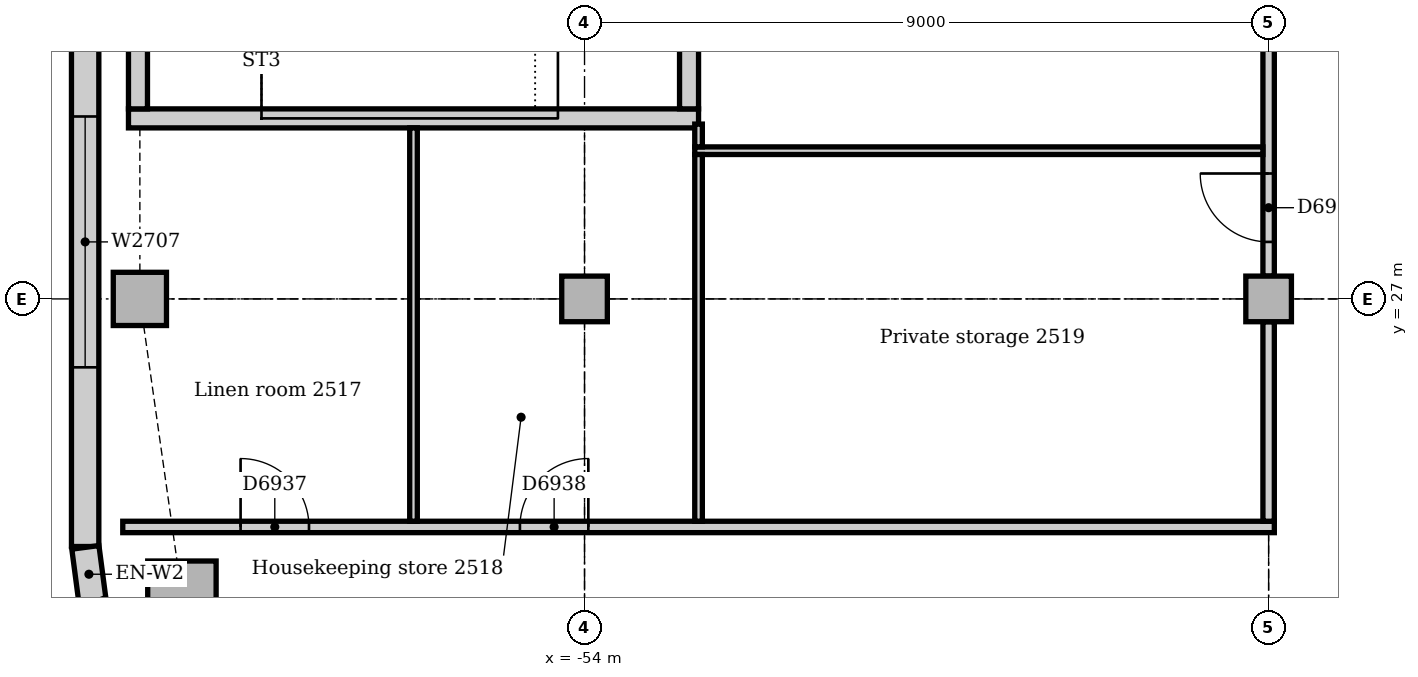
"""IFC4 building model, lengths in metres.
Left out: names, types, materials, properties, quantities, classifications, styles, units other than length and angle.
Written with IfcOpenShell. Run it as: python <this file> out.ifc"""

import sys

from ifc_helpers import new_model, si_unit, direction, frame, frame_2d, origin, origin_2d, place, context, subcontext, project, spatial, rectangle, extrude, element, fill, save


model = new_model("IFC4")
c1 = context("Model", 3, precision=1e-05, world=origin(), true_north=direction((0.0, 1.0)))
c2 = subcontext(c1, "Body", "Model", "MODEL_VIEW")
j1 = project(units=[si_unit("LENGTHUNIT", "METRE"), si_unit("PLANEANGLEUNIT", "RADIAN")], contexts=[c1])
p1 = place(None, origin())
s1 = spatial("IfcSite", under=j1, at=p1, CompositionType="ELEMENT")
p2 = place(p1, origin())
s2 = spatial("IfcBuilding", under=s1, at=p2, CompositionType="ELEMENT")
p3 = place(p2, frame((0.0, 0.0, 108.0)))
s3 = spatial("IfcBuildingStorey", under=s2, at=p3, CompositionType="ELEMENT", Elevation=108.0)
p4 = place(p3, frame((-60.0, 29.375, 0.0), z_axis=(0.0, 0.0, 1.0), x_axis=(1.0, 0.0, 0.0)))
e1 = element("IfcWall", 1, at=p4, inside=s3, PredefinedType="SOLIDWALL", context=c2, shape_type="SweptSolid", body=[
    extrude(rectangle(XDim=7.5, YDim=0.25, at=frame_2d((3.75, 0.0))), origin(), (0.0, 0.0, 1.0), 4.0),
])
for number, where, z_axis, x_axis in (
    (2, (-52.625, 29.5, 0.0), (0.0, 0.0, 1.0), (0.0, 1.0, 0.0)),
    (3, (-59.875, 33.5, 0.0), (0.0, 0.0, 1.0), (0.0, -1.0, 0.0)),
):
    element("IfcWall", number, at=place(p3, frame(where, z_axis=z_axis, x_axis=x_axis)), inside=s3, PredefinedType="SOLIDWALL", context=c2, shape_type="SweptSolid", body=[
        extrude(rectangle(XDim=4.0, YDim=0.25, at=frame_2d((2.0, 0.0))), origin(), (0.0, 0.0, 1.0), 4.0),
    ])
p5 = place(p3, frame((-59.297, 23.102, 0.0), z_axis=(0.0, 0.0, 1.0), x_axis=(1.0, 0.0, 0.0)))
e4 = element("IfcColumn", 4, at=p5, inside=s3, PredefinedType="COLUMN", context=c2, shape_type="SweptSolid", body=[
    extrude(rectangle(XDim=0.9, YDim=0.9, at=origin_2d()), origin(), (0.0, 0.0, 1.0), 3.85),
])
p6 = place(p3, frame((-59.85, 27.0, 0.0), z_axis=(0.0, 0.0, 1.0), x_axis=(1.0, 0.0, 0.0)))
e5 = element("IfcColumn", 5, at=p6, inside=s3, PredefinedType="COLUMN", context=c2, shape_type="SweptSolid", body=[
    extrude(rectangle(XDim=0.7, YDim=0.7, at=origin_2d()), origin(), (0.0, 0.0, 1.0), 3.85),
])
for number, where, z_axis, x_axis in (
    (6, (-54.0, 27.0, 0.0), (0.0, 0.0, 1.0), (1.0, 0.0, 0.0)),
    (7, (-45.0, 27.0, 0.0), (0.0, 0.0, 1.0), (1.0, 0.0, 0.0)),
):
    element("IfcColumn", number, at=place(p3, frame(where, z_axis=z_axis, x_axis=x_axis)), inside=s3, PredefinedType="COLUMN", context=c2, shape_type="SweptSolid", body=[
        extrude(rectangle(XDim=0.6, YDim=0.6, at=origin_2d()), origin(), (0.0, 0.0, 1.0), 3.85),
    ])
p7 = place(p3, frame((-60.57, 45.257, 0.0), z_axis=(0.0, 0.0, 1.0), x_axis=(0.0, -1.0, 0.0)))
e8 = element("IfcWall", 8, at=p7, inside=s3, PredefinedType="STANDARD", context=c2, shape_type="SweptSolid", body=[
    extrude(rectangle(XDim=21.515, YDim=0.36, at=frame_2d((10.757, 0.0))), origin(), (0.0, 0.0, 1.0), 3.85),
])
p8 = place(p7, frame((3.107, 0.0, 0.9)))
e9 = element("IfcOpeningElement", 9, at=p8, cuts=e8, PredefinedType="OPENING", context=c2, shape_type="SweptSolid", body=[
    extrude(rectangle(XDim=1.8, YDim=1.6, at=frame_2d((0.9, 0.8))), frame((0.0, 0.19, 0.0), z_axis=(0.0, -1.0, 0.0), x_axis=(1.0, 0.0, 0.0)), (0.0, 0.0, 1.0), 0.38),
])
p9 = place(p7, frame((6.857, 0.0, 0.9)))
e10 = element("IfcOpeningElement", 10, at=p9, cuts=e8, PredefinedType="OPENING", context=c2, shape_type="SweptSolid", body=[
    extrude(rectangle(XDim=3.3, YDim=1.6, at=frame_2d((1.65, 0.8))), frame((0.0, 0.19, 0.0), z_axis=(0.0, -1.0, 0.0), x_axis=(1.0, 0.0, 0.0)), (0.0, 0.0, 1.0), 0.38),
])
p10 = place(p7, frame((11.357, 0.0, 0.9)))
e11 = element("IfcOpeningElement", 11, at=p10, cuts=e8, PredefinedType="OPENING", context=c2, shape_type="SweptSolid", body=[
    extrude(rectangle(XDim=3.3, YDim=1.6, at=frame_2d((1.65, 0.8))), frame((0.0, 0.19, 0.0), z_axis=(0.0, -1.0, 0.0), x_axis=(1.0, 0.0, 0.0)), (0.0, 0.0, 1.0), 0.38),
])
p11 = place(p7, frame((15.857, 0.0, 0.9)))
e12 = element("IfcOpeningElement", 12, at=p11, cuts=e8, PredefinedType="OPENING", context=c2, shape_type="SweptSolid", body=[
    extrude(rectangle(XDim=3.3, YDim=1.6, at=frame_2d((1.65, 0.8))), frame((0.0, 0.19, 0.0), z_axis=(0.0, -1.0, 0.0), x_axis=(1.0, 0.0, 0.0)), (0.0, 0.0, 1.0), 0.38),
])
p12 = place(p3, frame((-60.567, 23.731, 0.0), z_axis=(0.0, 0.0, 1.0), x_axis=(0.13055608231, -0.99144092581, 0.0)))
e13 = element("IfcWall", 13, at=p12, inside=s3, PredefinedType="STANDARD", context=c2, shape_type="SweptSolid", body=[
    extrude(rectangle(XDim=0.713, YDim=0.36, at=frame_2d((0.356, 0.0))), origin(), (0.0, 0.0, 1.0), 3.85),
])
p13 = place(p3, frame((-60.075, 24.0, 0.0), z_axis=(0.0, 0.0, 1.0), x_axis=(1.0, 0.0, 0.0)))
e14 = element("IfcWall", 14, at=p13, inside=s3, PredefinedType="PARTITIONING", context=c2, shape_type="SweptSolid", body=[
    extrude(rectangle(XDim=15.15, YDim=0.15, at=frame_2d((7.575, 0.0))), origin(), (0.0, 0.0, 1.0), 3.85),
])
p14 = place(p13, frame((1.55, 0.0, 0.0)))
e15 = element("IfcOpeningElement", 15, at=p14, cuts=e14, PredefinedType="OPENING", context=c2, shape_type="SweptSolid", body=[
    extrude(rectangle(XDim=0.9, YDim=2.1, at=frame_2d((0.45, 1.05))), frame((0.0, 0.085, 0.0), z_axis=(0.0, -1.0, 0.0), x_axis=(1.0, 0.0, 0.0)), (0.0, 0.0, 1.0), 0.17),
])
p15 = place(p13, frame((5.225, 0.0, 0.0)))
e16 = element("IfcOpeningElement", 16, at=p15, cuts=e14, PredefinedType="OPENING", context=c2, shape_type="SweptSolid", body=[
    extrude(rectangle(XDim=0.9, YDim=2.1, at=frame_2d((0.45, 1.05))), frame((0.0, 0.085, 0.0), z_axis=(0.0, -1.0, 0.0), x_axis=(1.0, 0.0, 0.0)), (0.0, 0.0, 1.0), 0.17),
])
p16 = place(p3, frame((-45.0, 24.075, 0.0), z_axis=(0.0, 0.0, 1.0), x_axis=(0.0, 1.0, 0.0)))
e17 = element("IfcWall", 17, at=p16, inside=s3, PredefinedType="PARTITIONING", context=c2, shape_type="SweptSolid", body=[
    extrude(rectangle(XDim=2.625, YDim=0.15, at=frame_2d((1.312, 0.0))), origin(), (0.0, 0.0, 1.0), 3.362),
])
p17 = place(p3, frame((-45.0, 27.3, 0.0), z_axis=(0.0, 0.0, 1.0), x_axis=(0.0, 1.0, 0.0)))
e18 = element("IfcWall", 18, at=p17, inside=s3, PredefinedType="PARTITIONING", context=c2, shape_type="SweptSolid", body=[
    extrude(rectangle(XDim=6.675, YDim=0.15, at=frame_2d((3.337, 0.0))), origin(), (0.0, 0.0, 1.0), 3.362),
])
p18 = place(p17, frame((0.45, 0.0, 0.0)))
e19 = element("IfcOpeningElement", 19, at=p18, cuts=e18, PredefinedType="OPENING", context=c2, shape_type="SweptSolid", body=[
    extrude(rectangle(XDim=0.9, YDim=2.1, at=frame_2d((0.45, 1.05))), frame((0.0, 0.085, 0.0), z_axis=(0.0, -1.0, 0.0), x_axis=(1.0, 0.0, 0.0)), (0.0, 0.0, 1.0), 0.17),
])
p19 = place(p3, frame((-52.55, 28.95, 0.0), z_axis=(0.0, 0.0, 1.0), x_axis=(1.0, 0.0, 0.0)))
e20 = element("IfcWall", 20, at=p19, inside=s3, PredefinedType="PARTITIONING", context=c2, shape_type="SweptSolid", body=[
    extrude(rectangle(XDim=7.475, YDim=0.1, at=frame_2d((3.737, 0.0))), origin(), (0.0, 0.0, 1.0), 3.85),
])
p20 = place(p3, frame((-56.25, 24.075, 0.0), z_axis=(0.0, 0.0, 1.0), x_axis=(0.0, 1.0, 0.0)))
e21 = element("IfcWall", 21, at=p20, inside=s3, PredefinedType="PARTITIONING", context=c2, shape_type="SweptSolid", body=[
    extrude(rectangle(XDim=5.175, YDim=0.1, at=frame_2d((2.587, 0.0))), origin(), (0.0, 0.0, 1.0), 3.85),
])
p21 = place(p3, frame((-52.5, 29.0, 0.0), z_axis=(0.0, 0.0, 1.0), x_axis=(0.0, 1.0, 0.0)))
e22 = element("IfcWall", 22, at=p21, inside=s3, PredefinedType="PARTITIONING", context=c2, shape_type="SweptSolid", body=[
    extrude(rectangle(XDim=0.3, YDim=0.1, at=frame_2d((0.15, 0.0))), origin(), (0.0, 0.0, 1.0), 3.85),
])
p22 = place(p3, frame((-52.5, 24.075, 0.0), z_axis=(0.0, 0.0, 1.0), x_axis=(0.0, 1.0, 0.0)))
e23 = element("IfcWall", 23, at=p22, inside=s3, PredefinedType="PARTITIONING", context=c2, shape_type="SweptSolid", body=[
    extrude(rectangle(XDim=4.825, YDim=0.1, at=frame_2d((2.413, 0.0))), origin(), (0.0, 0.0, 1.0), 3.85),
])
p23 = place(p11, origin())
e24 = element("IfcWindow", 24, at=p23, inside=s3, PartitioningType="SINGLE_PANEL", PredefinedType="WINDOW", context=c2, shape_type="SweptSolid", body=[
    extrude(rectangle(XDim=3.3, YDim=1.6, at=frame_2d((1.65, 0.8))), frame((0.0, 0.13, 0.0), z_axis=(0.0, -1.0, 0.0), x_axis=(1.0, 0.0, 0.0)), (0.0, 0.0, 1.0), 0.06),
])
fill(e12, e24)
p24 = place(p14, origin())
e25 = element("IfcDoor", 25, at=p24, inside=s3, OperationType="SINGLE_SWING_LEFT", PredefinedType="DOOR", context=c2, shape_type="SweptSolid", body=[
    extrude(rectangle(XDim=0.9, YDim=2.1, at=frame_2d((0.45, 1.05))), frame((0.0, 0.025, 0.0), z_axis=(0.0, -1.0, 0.0), x_axis=(1.0, 0.0, 0.0)), (0.0, 0.0, 1.0), 0.05),
])
fill(e15, e25)
p25 = place(p15, origin())
e26 = element("IfcDoor", 26, at=p25, inside=s3, OperationType="SINGLE_SWING_RIGHT", PredefinedType="DOOR", context=c2, shape_type="SweptSolid", body=[
    extrude(rectangle(XDim=0.9, YDim=2.1, at=frame_2d((0.45, 1.05))), frame((0.0, 0.025, 0.0), z_axis=(0.0, -1.0, 0.0), x_axis=(1.0, 0.0, 0.0)), (0.0, 0.0, 1.0), 0.05),
])
fill(e16, e26)
p26 = place(p18, origin())
e27 = element("IfcDoor", 27, at=p26, inside=s3, OperationType="SINGLE_SWING_RIGHT", PredefinedType="DOOR", context=c2, shape_type="SweptSolid", body=[
    extrude(rectangle(XDim=0.9, YDim=2.1, at=frame_2d((0.45, 1.05))), frame((0.0, 0.025, 0.0), z_axis=(0.0, -1.0, 0.0), x_axis=(1.0, 0.0, 0.0)), (0.0, 0.0, 1.0), 0.05),
])
fill(e19, e27)
save(model, sys.argv[1])
